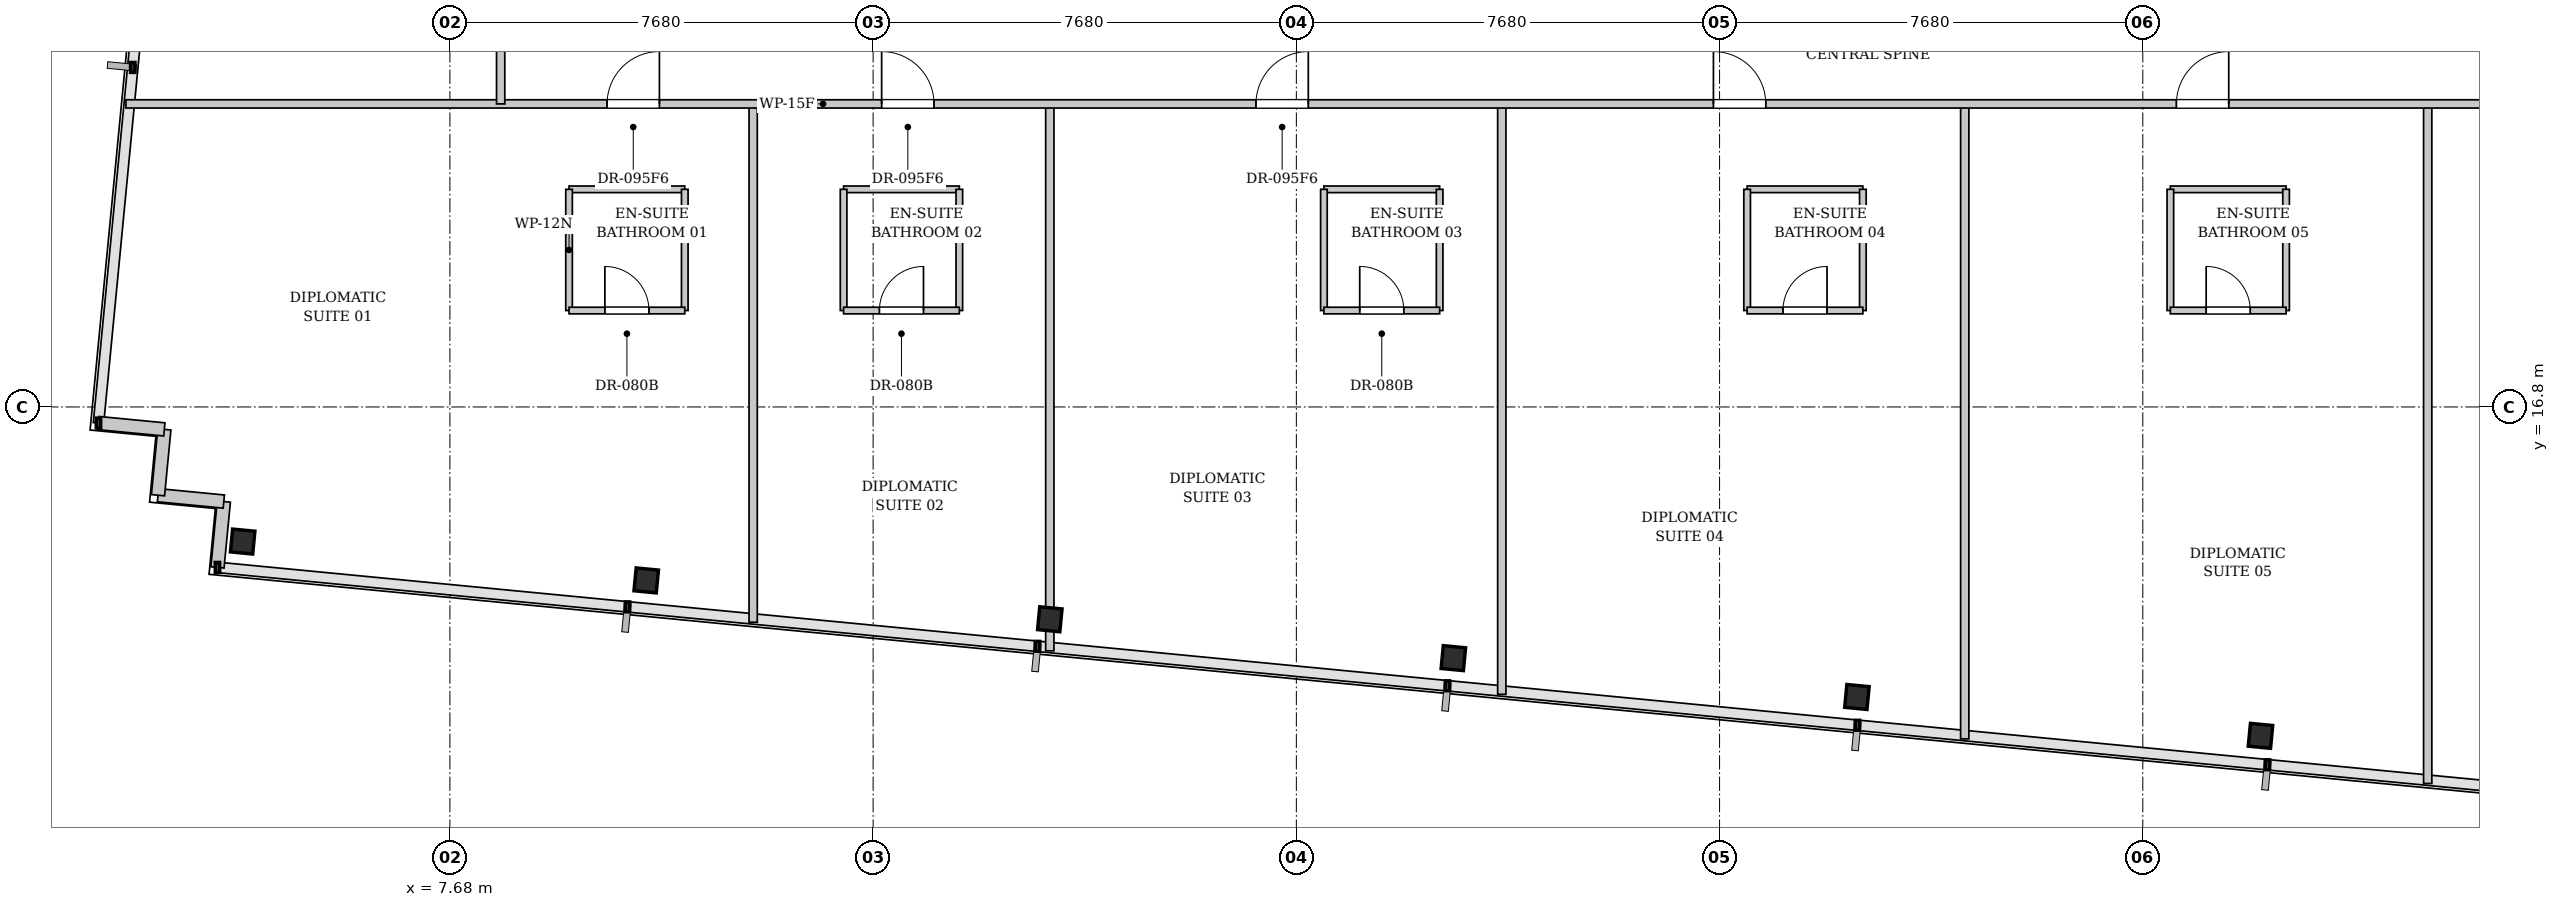
"""IFC4 building model, lengths in metres.
Left out: names, types, materials, properties, quantities, classifications, styles, units other than length and angle.
Written with IfcOpenShell. Run it as: python <this file> out.ifc"""

import sys

from ifc_helpers import new_model, si_unit, direction, frame, frame_2d, origin, origin_2d, place, context, subcontext, project, spatial, rectangle, i_section, extrude, element, fill, save


model = new_model("IFC4")
c1 = context("Model", 3, precision=1e-05, world=origin(), true_north=direction((0.0, 1.0)))
c2 = subcontext(c1, "Body", "Model", "MODEL_VIEW")
j1 = project(units=[si_unit("LENGTHUNIT", "METRE"), si_unit("PLANEANGLEUNIT", "RADIAN")], contexts=[c1])
p1 = place(None, origin())
s1 = spatial("IfcSite", under=j1, at=p1, CompositionType="ELEMENT")
p2 = place(p1, origin())
s2 = spatial("IfcBuilding", under=s1, at=p2, CompositionType="ELEMENT")
p3 = place(p2, frame((0.0, 0.0, 165.5)))
s3 = spatial("IfcBuildingStorey", under=s2, at=p3, CompositionType="ELEMENT", Elevation=165.5)
for number, where, z_axis, x_axis in (
    (1, (3.919, 14.357, 0.0), (0.0, 0.0, 1.0), (0.995, -0.096, 0.0)),
    (2, (11.242, 13.652, 0.0), (0.0, 0.0, 1.0), (0.995, -0.096, 0.0)),
    (3, (18.566, 12.947, 0.0), (0.0, 0.0, 1.0), (0.995, -0.096, 0.0)),
    (4, (25.889, 12.242, 0.0), (0.0, 0.0, 1.0), (0.995, -0.096, 0.0)),
    (5, (33.212, 11.537, 0.0), (0.0, 0.0, 1.0), (0.995, -0.096, 0.0)),
    (6, (40.536, 10.832, 0.0), (0.0, 0.0, 1.0), (0.995, -0.096, 0.0)),
):
    element("IfcColumn", number, at=place(p3, frame(where, z_axis=z_axis, x_axis=x_axis)), inside=s3, PredefinedType="COLUMN", context=c2, shape_type="SweptSolid", body=[
        extrude(i_section(OverallWidth=0.406, OverallDepth=0.416, WebThickness=0.03, FlangeThickness=0.048, FilletRadius=0.015, at=origin_2d()), origin(), (0.0, 0.0, 1.0), 3.3),
    ])
for number, where, z_axis, x_axis in (
    (7, (3.462, 13.889, 0.0), (0.0, 0.0, 1.0), (0.096, 0.995, 0.0)),
    (8, (3.577, 15.083, 0.0), (0.0, 0.0, 1.0), (-0.995, 0.096, 0.0)),
):
    element("IfcWall", number, at=place(p3, frame(where, z_axis=z_axis, x_axis=x_axis)), inside=s3, PredefinedType="SOLIDWALL", context=c2, shape_type="SweptSolid", body=[
        extrude(rectangle(XDim=1.2, YDim=0.24, at=frame_2d((0.6, 0.0))), origin(), (0.0, 0.0, 1.0), 3.08),
    ])
p4 = place(p3, frame((2.383, 15.198, 0.0), z_axis=(0.0, 0.0, 1.0), x_axis=(0.095836473879, 0.995397091755, 0.0)))
e9 = element("IfcWall", 9, at=p4, inside=s3, PredefinedType="SOLIDWALL", context=c2, shape_type="SweptSolid", body=[
    extrude(rectangle(XDim=1.2, YDim=0.24, at=frame_2d((0.6, 0.0))), origin(), (0.0, 0.0, 1.0), 3.08),
])
p5 = place(p3, frame((2.498, 16.393, 0.0), z_axis=(0.0, 0.0, 1.0), x_axis=(-0.995398960025, 0.095817067274, 0.0)))
e10 = element("IfcWall", 10, at=p5, inside=s3, PredefinedType="SOLIDWALL", context=c2, shape_type="SweptSolid", body=[
    extrude(rectangle(XDim=1.2, YDim=0.24, at=frame_2d((0.6, 0.0))), origin(), (0.0, 0.0, 1.0), 3.08),
])
p6 = place(p3, frame((9.842, 20.75, 0.0), z_axis=(0.0, 0.0, 1.0), x_axis=(1.0, 0.0, 0.0)))
e11 = element("IfcWall", 11, at=p6, inside=s3, PredefinedType="PARTITIONING", context=c2, shape_type="SweptSolid", body=[
    extrude(rectangle(XDim=2.1, YDim=0.12, at=frame_2d((1.05, 0.0))), origin(), (0.0, 0.0, 1.0), 3.08),
])
for number, where, z_axis, x_axis in (
    (12, (9.842, 18.55, 0.0), (0.0, 0.0, 1.0), (0.0, 1.0, 0.0)),
    (13, (11.942, 18.55, 0.0), (0.0, 0.0, 1.0), (0.0, 1.0, 0.0)),
):
    element("IfcWall", number, at=place(p3, frame(where, z_axis=z_axis, x_axis=x_axis)), inside=s3, PredefinedType="PARTITIONING", context=c2, shape_type="SweptSolid", body=[
        extrude(rectangle(XDim=2.2, YDim=0.12, at=frame_2d((1.1, 0.0))), origin(), (0.0, 0.0, 1.0), 3.08),
    ])
p7 = place(p3, frame((9.842, 18.55, 0.0), z_axis=(0.0, 0.0, 1.0), x_axis=(1.0, 0.0, 0.0)))
e14 = element("IfcWall", 14, at=p7, inside=s3, PredefinedType="PARTITIONING", context=c2, shape_type="SweptSolid", body=[
    extrude(rectangle(XDim=2.1, YDim=0.12, at=frame_2d((1.05, 0.0))), origin(), (0.0, 0.0, 1.0), 3.08),
])
p8 = place(p7, frame((0.65, 0.0, 0.0)))
e15 = element("IfcOpeningElement", 15, at=p8, cuts=e14, PredefinedType="OPENING", context=c2, shape_type="SweptSolid", body=[
    extrude(rectangle(XDim=0.8, YDim=2.1, at=frame_2d((0.4, 1.05))), frame((0.0, 0.07, 0.0), z_axis=(0.0, -1.0, 0.0), x_axis=(1.0, 0.0, 0.0)), (0.0, 0.0, 1.0), 0.14),
])
p9 = place(p3, frame((14.824, 20.75, 0.0), z_axis=(0.0, 0.0, 1.0), x_axis=(1.0, 0.0, 0.0)))
e16 = element("IfcWall", 16, at=p9, inside=s3, PredefinedType="PARTITIONING", context=c2, shape_type="SweptSolid", body=[
    extrude(rectangle(XDim=2.1, YDim=0.12, at=frame_2d((1.05, 0.0))), origin(), (0.0, 0.0, 1.0), 3.08),
])
for number, where, z_axis, x_axis in (
    (17, (14.824, 18.55, 0.0), (0.0, 0.0, 1.0), (0.0, 1.0, 0.0)),
    (18, (16.924, 18.55, 0.0), (0.0, 0.0, 1.0), (0.0, 1.0, 0.0)),
):
    element("IfcWall", number, at=place(p3, frame(where, z_axis=z_axis, x_axis=x_axis)), inside=s3, PredefinedType="PARTITIONING", context=c2, shape_type="SweptSolid", body=[
        extrude(rectangle(XDim=2.2, YDim=0.12, at=frame_2d((1.1, 0.0))), origin(), (0.0, 0.0, 1.0), 3.08),
    ])
p10 = place(p3, frame((14.824, 18.55, 0.0), z_axis=(0.0, 0.0, 1.0), x_axis=(1.0, 0.0, 0.0)))
e19 = element("IfcWall", 19, at=p10, inside=s3, PredefinedType="PARTITIONING", context=c2, shape_type="SweptSolid", body=[
    extrude(rectangle(XDim=2.1, YDim=0.12, at=frame_2d((1.05, 0.0))), origin(), (0.0, 0.0, 1.0), 3.08),
])
p11 = place(p10, frame((0.65, 0.0, 0.0)))
e20 = element("IfcOpeningElement", 20, at=p11, cuts=e19, PredefinedType="OPENING", context=c2, shape_type="SweptSolid", body=[
    extrude(rectangle(XDim=0.8, YDim=2.1, at=frame_2d((0.4, 1.05))), frame((0.0, 0.07, 0.0), z_axis=(0.0, -1.0, 0.0), x_axis=(1.0, 0.0, 0.0)), (0.0, 0.0, 1.0), 0.14),
])
p12 = place(p3, frame((13.183, 12.893, 0.0), z_axis=(0.0, 0.0, 1.0), x_axis=(0.0, 1.0, 0.0)))
e21 = element("IfcWall", 21, at=p12, inside=s3, PredefinedType="PARTITIONING", context=c2, shape_type="SweptSolid", body=[
    extrude(rectangle(XDim=9.427, YDim=0.15, at=frame_2d((4.714, 0.0))), origin(), (0.0, 0.0, 1.0), 3.08),
])
p13 = place(p3, frame((23.54, 20.75, 0.0), z_axis=(0.0, 0.0, 1.0), x_axis=(1.0, 0.0, 0.0)))
e22 = element("IfcWall", 22, at=p13, inside=s3, PredefinedType="PARTITIONING", context=c2, shape_type="SweptSolid", body=[
    extrude(rectangle(XDim=2.1, YDim=0.12, at=frame_2d((1.05, 0.0))), origin(), (0.0, 0.0, 1.0), 3.08),
])
for number, where, z_axis, x_axis in (
    (23, (23.54, 18.55, 0.0), (0.0, 0.0, 1.0), (0.0, 1.0, 0.0)),
    (24, (25.64, 18.55, 0.0), (0.0, 0.0, 1.0), (0.0, 1.0, 0.0)),
):
    element("IfcWall", number, at=place(p3, frame(where, z_axis=z_axis, x_axis=x_axis)), inside=s3, PredefinedType="PARTITIONING", context=c2, shape_type="SweptSolid", body=[
        extrude(rectangle(XDim=2.2, YDim=0.12, at=frame_2d((1.1, 0.0))), origin(), (0.0, 0.0, 1.0), 3.08),
    ])
p14 = place(p3, frame((23.54, 18.55, 0.0), z_axis=(0.0, 0.0, 1.0), x_axis=(1.0, 0.0, 0.0)))
e25 = element("IfcWall", 25, at=p14, inside=s3, PredefinedType="PARTITIONING", context=c2, shape_type="SweptSolid", body=[
    extrude(rectangle(XDim=2.1, YDim=0.12, at=frame_2d((1.05, 0.0))), origin(), (0.0, 0.0, 1.0), 3.08),
])
p15 = place(p14, frame((0.65, 0.0, 0.0)))
e26 = element("IfcOpeningElement", 26, at=p15, cuts=e25, PredefinedType="OPENING", context=c2, shape_type="SweptSolid", body=[
    extrude(rectangle(XDim=0.8, YDim=2.1, at=frame_2d((0.4, 1.05))), frame((0.0, 0.07, 0.0), z_axis=(0.0, -1.0, 0.0), x_axis=(1.0, 0.0, 0.0)), (0.0, 0.0, 1.0), 0.14),
])
p16 = place(p3, frame((18.566, 12.374, 0.0), z_axis=(0.0, 0.0, 1.0), x_axis=(0.0, 1.0, 0.0)))
e27 = element("IfcWall", 27, at=p16, inside=s3, PredefinedType="PARTITIONING", context=c2, shape_type="SweptSolid", body=[
    extrude(rectangle(XDim=9.946, YDim=0.15, at=frame_2d((4.973, 0.0))), origin(), (0.0, 0.0, 1.0), 2.475),
])
p17 = place(p3, frame((31.22, 20.75, 0.0), z_axis=(0.0, 0.0, 1.0), x_axis=(1.0, 0.0, 0.0)))
e28 = element("IfcWall", 28, at=p17, inside=s3, PredefinedType="PARTITIONING", context=c2, shape_type="SweptSolid", body=[
    extrude(rectangle(XDim=2.1, YDim=0.12, at=frame_2d((1.05, 0.0))), origin(), (0.0, 0.0, 1.0), 3.08),
])
for number, where, z_axis, x_axis in (
    (29, (31.22, 18.55, 0.0), (0.0, 0.0, 1.0), (0.0, 1.0, 0.0)),
    (30, (33.32, 18.55, 0.0), (0.0, 0.0, 1.0), (0.0, 1.0, 0.0)),
):
    element("IfcWall", number, at=place(p3, frame(where, z_axis=z_axis, x_axis=x_axis)), inside=s3, PredefinedType="PARTITIONING", context=c2, shape_type="SweptSolid", body=[
        extrude(rectangle(XDim=2.2, YDim=0.12, at=frame_2d((1.1, 0.0))), origin(), (0.0, 0.0, 1.0), 3.08),
    ])
p18 = place(p3, frame((31.22, 18.55, 0.0), z_axis=(0.0, 0.0, 1.0), x_axis=(1.0, 0.0, 0.0)))
e31 = element("IfcWall", 31, at=p18, inside=s3, PredefinedType="PARTITIONING", context=c2, shape_type="SweptSolid", body=[
    extrude(rectangle(XDim=2.1, YDim=0.12, at=frame_2d((1.05, 0.0))), origin(), (0.0, 0.0, 1.0), 3.08),
])
p19 = place(p18, frame((0.65, 0.0, 0.0)))
e32 = element("IfcOpeningElement", 32, at=p19, cuts=e31, PredefinedType="OPENING", context=c2, shape_type="SweptSolid", body=[
    extrude(rectangle(XDim=0.8, YDim=2.1, at=frame_2d((0.4, 1.05))), frame((0.0, 0.07, 0.0), z_axis=(0.0, -1.0, 0.0), x_axis=(1.0, 0.0, 0.0)), (0.0, 0.0, 1.0), 0.14),
])
p20 = place(p3, frame((26.768, 11.585, 0.0), z_axis=(0.0, 0.0, 1.0), x_axis=(0.0, 1.0, 0.0)))
e33 = element("IfcWall", 33, at=p20, inside=s3, PredefinedType="PARTITIONING", context=c2, shape_type="SweptSolid", body=[
    extrude(rectangle(XDim=10.735, YDim=0.15, at=frame_2d((5.368, 0.0))), origin(), (0.0, 0.0, 1.0), 3.08),
])
p21 = place(p3, frame((38.9, 20.75, 0.0), z_axis=(0.0, 0.0, 1.0), x_axis=(1.0, 0.0, 0.0)))
e34 = element("IfcWall", 34, at=p21, inside=s3, PredefinedType="PARTITIONING", context=c2, shape_type="SweptSolid", body=[
    extrude(rectangle(XDim=2.1, YDim=0.12, at=frame_2d((1.05, 0.0))), origin(), (0.0, 0.0, 1.0), 3.08),
])
p22 = place(p3, frame((38.9, 18.55, 0.0), z_axis=(0.0, 0.0, 1.0), x_axis=(0.0, 1.0, 0.0)))
e35 = element("IfcWall", 35, at=p22, inside=s3, PredefinedType="PARTITIONING", context=c2, shape_type="SweptSolid", body=[
    extrude(rectangle(XDim=2.2, YDim=0.12, at=frame_2d((1.1, 0.0))), origin(), (0.0, 0.0, 1.0), 2.475),
])
p23 = place(p3, frame((41.0, 18.55, 0.0), z_axis=(0.0, 0.0, 1.0), x_axis=(0.0, 1.0, 0.0)))
e36 = element("IfcWall", 36, at=p23, inside=s3, PredefinedType="PARTITIONING", context=c2, shape_type="SweptSolid", body=[
    extrude(rectangle(XDim=2.2, YDim=0.12, at=frame_2d((1.1, 0.0))), origin(), (0.0, 0.0, 1.0), 3.08),
])
p24 = place(p3, frame((38.9, 18.55, 0.0), z_axis=(0.0, 0.0, 1.0), x_axis=(1.0, 0.0, 0.0)))
e37 = element("IfcWall", 37, at=p24, inside=s3, PredefinedType="PARTITIONING", context=c2, shape_type="SweptSolid", body=[
    extrude(rectangle(XDim=2.1, YDim=0.12, at=frame_2d((1.05, 0.0))), origin(), (0.0, 0.0, 1.0), 3.08),
])
p25 = place(p24, frame((0.65, 0.0, 0.0)))
e38 = element("IfcOpeningElement", 38, at=p25, cuts=e37, PredefinedType="OPENING", context=c2, shape_type="SweptSolid", body=[
    extrude(rectangle(XDim=0.8, YDim=2.1, at=frame_2d((0.4, 1.05))), frame((0.0, 0.07, 0.0), z_axis=(0.0, -1.0, 0.0), x_axis=(1.0, 0.0, 0.0)), (0.0, 0.0, 1.0), 0.14),
])
p26 = place(p3, frame((35.169, 10.776, 0.0), z_axis=(0.0, 0.0, 1.0), x_axis=(0.0, 1.0, 0.0)))
e39 = element("IfcWall", 39, at=p26, inside=s3, PredefinedType="PARTITIONING", context=c2, shape_type="SweptSolid", body=[
    extrude(rectangle(XDim=11.544, YDim=0.15, at=frame_2d((5.772, 0.0))), origin(), (0.0, 0.0, 1.0), 3.08),
])
p27 = place(p3, frame((43.57, 9.967, 0.0), z_axis=(0.0, 0.0, 1.0), x_axis=(0.0, 1.0, 0.0)))
e40 = element("IfcWall", 40, at=p27, inside=s3, PredefinedType="PARTITIONING", context=c2, shape_type="SweptSolid", body=[
    extrude(rectangle(XDim=12.353, YDim=0.15, at=frame_2d((6.177, 0.0))), origin(), (0.0, 0.0, 1.0), 3.08),
])
p28 = place(p3, frame((1.801, 22.3, 0.0), z_axis=(0.0, 0.0, 1.0), x_axis=(1.0, 0.0, 0.0)))
e41 = element("IfcWall", 41, at=p28, inside=s3, PredefinedType="PARTITIONING", context=c2, shape_type="SweptSolid", body=[
    extrude(rectangle(XDim=57.505, YDim=0.15, at=frame_2d((28.752, 0.0))), origin(), (0.0, 0.0, 1.0), 3.08),
])
p29 = place(p28, frame((8.731, 0.0, 0.0)))
e42 = element("IfcOpeningElement", 42, at=p29, cuts=e41, PredefinedType="OPENING", context=c2, shape_type="SweptSolid", body=[
    extrude(rectangle(XDim=0.95, YDim=2.15, at=frame_2d((0.475, 1.075))), frame((0.0, 0.085, 0.0), z_axis=(0.0, -1.0, 0.0), x_axis=(1.0, 0.0, 0.0)), (0.0, 0.0, 1.0), 0.17),
])
p30 = place(p28, frame((13.714, 0.0, 0.0)))
e43 = element("IfcOpeningElement", 43, at=p30, cuts=e41, PredefinedType="OPENING", context=c2, shape_type="SweptSolid", body=[
    extrude(rectangle(XDim=0.95, YDim=2.15, at=frame_2d((0.475, 1.075))), frame((0.0, 0.085, 0.0), z_axis=(0.0, -1.0, 0.0), x_axis=(1.0, 0.0, 0.0)), (0.0, 0.0, 1.0), 0.17),
])
p31 = place(p28, frame((20.506, 0.0, 0.0)))
e44 = element("IfcOpeningElement", 44, at=p31, cuts=e41, PredefinedType="OPENING", context=c2, shape_type="SweptSolid", body=[
    extrude(rectangle(XDim=0.95, YDim=2.15, at=frame_2d((0.475, 1.075))), frame((0.0, 0.085, 0.0), z_axis=(0.0, -1.0, 0.0), x_axis=(1.0, 0.0, 0.0)), (0.0, 0.0, 1.0), 0.17),
])
p32 = place(p28, frame((28.808, 0.0, 0.0)))
e45 = element("IfcOpeningElement", 45, at=p32, cuts=e41, PredefinedType="OPENING", context=c2, shape_type="SweptSolid", body=[
    extrude(rectangle(XDim=0.95, YDim=2.15, at=frame_2d((0.475, 1.075))), frame((0.0, 0.085, 0.0), z_axis=(0.0, -1.0, 0.0), x_axis=(1.0, 0.0, 0.0)), (0.0, 0.0, 1.0), 0.17),
])
p33 = place(p28, frame((37.209, 0.0, 0.0)))
e46 = element("IfcOpeningElement", 46, at=p33, cuts=e41, PredefinedType="OPENING", context=c2, shape_type="SweptSolid", body=[
    extrude(rectangle(XDim=0.95, YDim=2.15, at=frame_2d((0.475, 1.075))), frame((0.0, 0.085, 0.0), z_axis=(0.0, -1.0, 0.0), x_axis=(1.0, 0.0, 0.0)), (0.0, 0.0, 1.0), 0.17),
])
p34 = place(p28, frame((44.343, 0.0, 0.0)))
e47 = element("IfcOpeningElement", 47, at=p34, cuts=e41, PredefinedType="OPENING", context=c2, shape_type="SweptSolid", body=[
    extrude(rectangle(XDim=0.95, YDim=2.15, at=frame_2d((0.475, 1.075))), frame((0.0, 0.085, 0.0), z_axis=(0.0, -1.0, 0.0), x_axis=(1.0, 0.0, 0.0)), (0.0, 0.0, 1.0), 0.17),
])
p35 = place(p28, frame((49.811, 0.0, 0.0)))
e48 = element("IfcOpeningElement", 48, at=p35, cuts=e41, PredefinedType="OPENING", context=c2, shape_type="SweptSolid", body=[
    extrude(rectangle(XDim=0.95, YDim=2.15, at=frame_2d((0.475, 1.075))), frame((0.0, 0.085, 0.0), z_axis=(0.0, -1.0, 0.0), x_axis=(1.0, 0.0, 0.0)), (0.0, 0.0, 1.0), 0.17),
])
p36 = place(p3, frame((8.601, 22.3, 0.0), z_axis=(0.0, 0.0, 1.0), x_axis=(0.0, 1.0, 0.0)))
e49 = element("IfcWall", 49, at=p36, inside=s3, PredefinedType="PARTITIONING", context=c2, shape_type="SweptSolid", body=[
    extrude(rectangle(XDim=28.547, YDim=0.15, at=frame_2d((14.273, 0.0))), origin(), (0.0, 0.0, 1.0), 3.08),
])
p37 = place(p36, frame((1.03, 0.0, 0.0)))
e50 = element("IfcOpeningElement", 50, at=p37, cuts=e49, PredefinedType="OPENING", context=c2, shape_type="SweptSolid", body=[
    extrude(rectangle(XDim=0.9, YDim=2.15, at=frame_2d((0.45, 1.075))), frame((0.0, 0.085, 0.0), z_axis=(0.0, -1.0, 0.0), x_axis=(1.0, 0.0, 0.0)), (0.0, 0.0, 1.0), 0.17),
])
p38 = place(p8, origin())
e51 = element("IfcDoor", 51, at=p38, inside=s3, OperationType="SINGLE_SWING_LEFT", PredefinedType="DOOR", context=c2, shape_type="SweptSolid", body=[
    extrude(rectangle(XDim=0.8, YDim=2.1, at=frame_2d((0.4, 1.05))), frame((0.0, 0.025, 0.0), z_axis=(0.0, -1.0, 0.0), x_axis=(1.0, 0.0, 0.0)), (0.0, 0.0, 1.0), 0.05),
])
fill(e15, e51)
p39 = place(p11, origin())
e52 = element("IfcDoor", 52, at=p39, inside=s3, OperationType="SINGLE_SWING_RIGHT", PredefinedType="DOOR", context=c2, shape_type="SweptSolid", body=[
    extrude(rectangle(XDim=0.8, YDim=2.1, at=frame_2d((0.4, 1.05))), frame((0.0, 0.025, 0.0), z_axis=(0.0, -1.0, 0.0), x_axis=(1.0, 0.0, 0.0)), (0.0, 0.0, 1.0), 0.05),
])
fill(e20, e52)
p40 = place(p15, origin())
e53 = element("IfcDoor", 53, at=p40, inside=s3, OperationType="SINGLE_SWING_LEFT", PredefinedType="DOOR", context=c2, shape_type="SweptSolid", body=[
    extrude(rectangle(XDim=0.8, YDim=2.1, at=frame_2d((0.4, 1.05))), frame((0.0, 0.025, 0.0), z_axis=(0.0, -1.0, 0.0), x_axis=(1.0, 0.0, 0.0)), (0.0, 0.0, 1.0), 0.05),
])
fill(e26, e53)
p41 = place(p19, origin())
e54 = element("IfcDoor", 54, at=p41, inside=s3, OperationType="SINGLE_SWING_RIGHT", PredefinedType="DOOR", context=c2, shape_type="SweptSolid", body=[
    extrude(rectangle(XDim=0.8, YDim=2.1, at=frame_2d((0.4, 1.05))), frame((0.0, 0.025, 0.0), z_axis=(0.0, -1.0, 0.0), x_axis=(1.0, 0.0, 0.0)), (0.0, 0.0, 1.0), 0.05),
])
fill(e32, e54)
p42 = place(p25, origin())
e55 = element("IfcDoor", 55, at=p42, inside=s3, OperationType="SINGLE_SWING_LEFT", PredefinedType="DOOR", context=c2, shape_type="SweptSolid", body=[
    extrude(rectangle(XDim=0.8, YDim=2.1, at=frame_2d((0.4, 1.05))), frame((0.0, 0.025, 0.0), z_axis=(0.0, -1.0, 0.0), x_axis=(1.0, 0.0, 0.0)), (0.0, 0.0, 1.0), 0.05),
])
fill(e38, e55)
p43 = place(p29, origin())
e56 = element("IfcDoor", 56, at=p43, inside=s3, OperationType="SINGLE_SWING_RIGHT", PredefinedType="DOOR", context=c2, shape_type="SweptSolid", body=[
    extrude(rectangle(XDim=0.95, YDim=2.15, at=frame_2d((0.475, 1.075))), frame((0.0, 0.025, 0.0), z_axis=(0.0, -1.0, 0.0), x_axis=(1.0, 0.0, 0.0)), (0.0, 0.0, 1.0), 0.05),
])
fill(e42, e56)
p44 = place(p30, origin())
e57 = element("IfcDoor", 57, at=p44, inside=s3, OperationType="SINGLE_SWING_LEFT", PredefinedType="DOOR", context=c2, shape_type="SweptSolid", body=[
    extrude(rectangle(XDim=0.95, YDim=2.15, at=frame_2d((0.475, 1.075))), frame((0.0, 0.025, 0.0), z_axis=(0.0, -1.0, 0.0), x_axis=(1.0, 0.0, 0.0)), (0.0, 0.0, 1.0), 0.05),
])
fill(e43, e57)
p45 = place(p31, origin())
e58 = element("IfcDoor", 58, at=p45, inside=s3, OperationType="SINGLE_SWING_RIGHT", PredefinedType="DOOR", context=c2, shape_type="SweptSolid", body=[
    extrude(rectangle(XDim=0.95, YDim=2.15, at=frame_2d((0.475, 1.075))), frame((0.0, 0.025, 0.0), z_axis=(0.0, -1.0, 0.0), x_axis=(1.0, 0.0, 0.0)), (0.0, 0.0, 1.0), 0.05),
])
fill(e44, e58)
p46 = place(p32, origin())
e59 = element("IfcDoor", 59, at=p46, inside=s3, OperationType="SINGLE_SWING_LEFT", PredefinedType="DOOR", context=c2, shape_type="SweptSolid", body=[
    extrude(rectangle(XDim=0.95, YDim=2.15, at=frame_2d((0.475, 1.075))), frame((0.0, 0.025, 0.0), z_axis=(0.0, -1.0, 0.0), x_axis=(1.0, 0.0, 0.0)), (0.0, 0.0, 1.0), 0.05),
])
fill(e45, e59)
p47 = place(p33, origin())
e60 = element("IfcDoor", 60, at=p47, inside=s3, OperationType="SINGLE_SWING_RIGHT", PredefinedType="DOOR", context=c2, shape_type="SweptSolid", body=[
    extrude(rectangle(XDim=0.95, YDim=2.15, at=frame_2d((0.475, 1.075))), frame((0.0, 0.025, 0.0), z_axis=(0.0, -1.0, 0.0), x_axis=(1.0, 0.0, 0.0)), (0.0, 0.0, 1.0), 0.05),
])
fill(e46, e60)
save(model, sys.argv[1])
